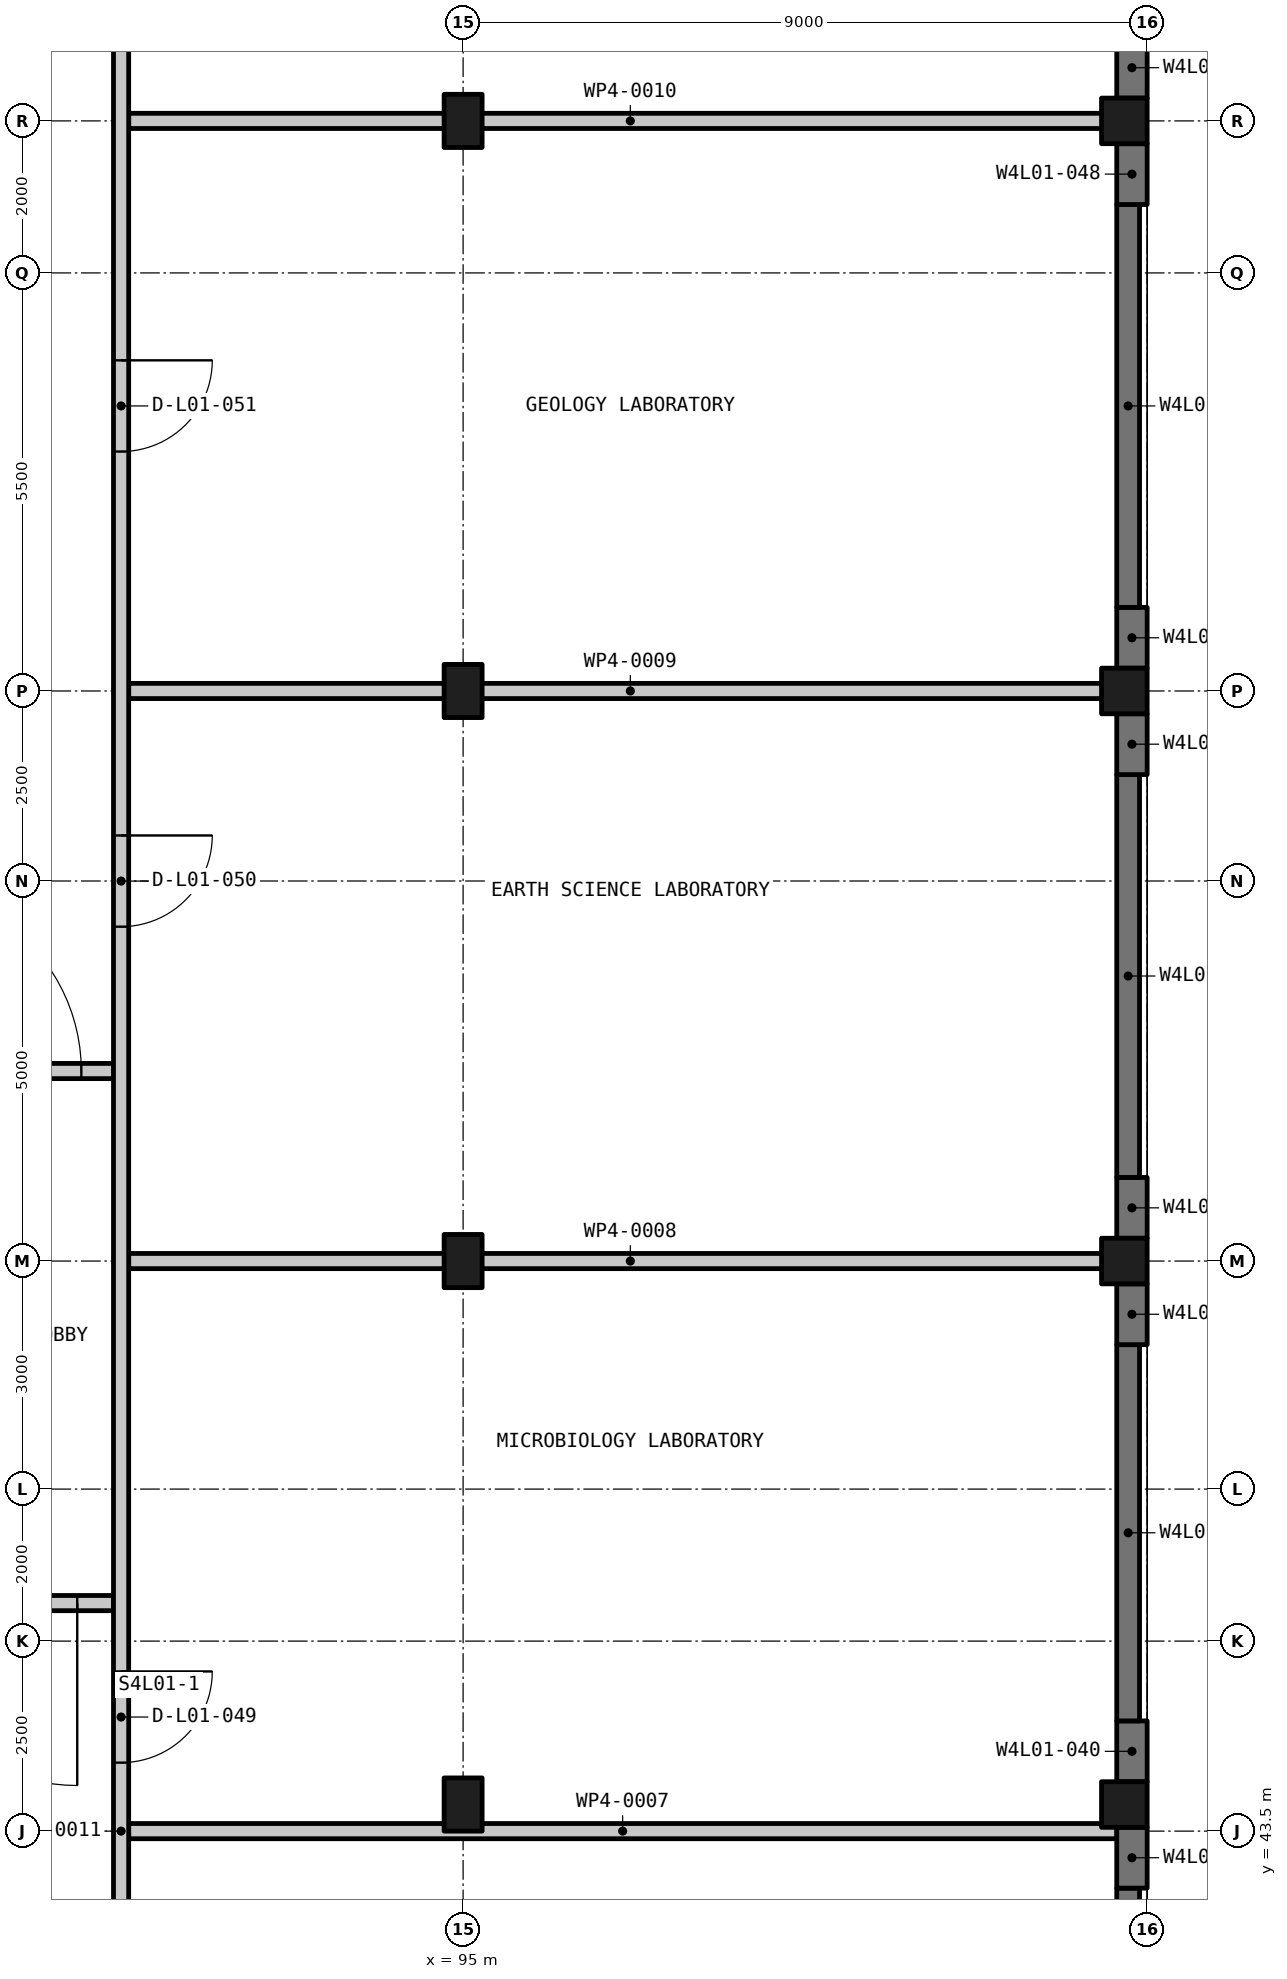
"""IFC4 building model, lengths in metres.
Left out: names, types, materials, properties, quantities, classifications, styles, units other than length and angle.
Written with IfcOpenShell. Run it as: python <this file> out.ifc"""

import sys

from ifc_helpers import new_model, si_unit, direction, frame, frame_2d, origin, origin_2d, place, context, subcontext, project, spatial, rectangle, extrude, element, fill, save


model = new_model("IFC4")
c1 = context("Model", 3, precision=1e-05, world=origin(), true_north=direction((0.0, 1.0)))
c2 = subcontext(c1, "Body", "Model", "MODEL_VIEW")
j1 = project(units=[si_unit("LENGTHUNIT", "METRE"), si_unit("PLANEANGLEUNIT", "RADIAN")], contexts=[c1])
p1 = place(None, origin())
s1 = spatial("IfcSite", under=j1, at=p1, CompositionType="ELEMENT")
p2 = place(p1, origin())
s2 = spatial("IfcBuilding", under=s1, at=p2, CompositionType="ELEMENT")
p3 = place(p2, frame((0.0, 0.0, 6.0)))
s3 = spatial("IfcBuildingStorey", under=s2, at=p3, CompositionType="ELEMENT", Elevation=6.0)
for number, where, z_axis, x_axis in (
    (1, (95.0, 43.85, -0.3), (0.0, 0.0, 1.0), (1.0, 0.0, 0.0)),
    (2, (95.0, 51.0, -0.3), (0.0, 0.0, 1.0), (1.0, 0.0, 0.0)),
    (3, (95.0, 58.5, -0.3), (0.0, 0.0, 1.0), (1.0, 0.0, 0.0)),
    (4, (95.0, 66.0, -0.3), (0.0, 0.0, 1.0), (1.0, 0.0, 0.0)),
):
    element("IfcColumn", number, at=place(p3, frame(where, z_axis=z_axis, x_axis=x_axis)), inside=s3, PredefinedType="COLUMN", context=c2, shape_type="SweptSolid", body=[
        extrude(rectangle(XDim=0.5, YDim=0.7, at=origin_2d()), origin(), (0.0, 0.0, 1.0), 5.25),
    ])
for number, where, z_axis, x_axis in (
    (5, (103.7, 43.85, -0.3), (0.0, 0.0, 1.0), (1.0, 0.0, 0.0)),
    (6, (103.7, 51.0, -0.3), (0.0, 0.0, 1.0), (1.0, 0.0, 0.0)),
    (7, (103.7, 58.5, -0.3), (0.0, 0.0, 1.0), (1.0, 0.0, 0.0)),
    (8, (103.7, 66.0, -0.3), (0.0, 0.0, 1.0), (1.0, 0.0, 0.0)),
):
    element("IfcColumn", number, at=place(p3, frame(where, z_axis=z_axis, x_axis=x_axis)), inside=s3, PredefinedType="COLUMN", context=c2, shape_type="SweptSolid", body=[
        extrude(rectangle(XDim=0.6, YDim=0.6, at=origin_2d()), origin(), (0.0, 0.0, 1.0), 5.25),
    ])
p4 = place(p3, frame((103.75, 37.1, -0.3), z_axis=(0.0, 0.0, 1.0), x_axis=(0.0, 1.0, 0.0)))
e9 = element("IfcWall", 9, at=p4, inside=s3, PredefinedType="SOLIDWALL", context=c2, shape_type="SweptSolid", body=[
    extrude(rectangle(XDim=5.65, YDim=0.3, at=frame_2d((2.825, 0.0))), origin(), (0.0, 0.0, 1.0), 5.25),
])
for number, where, z_axis, x_axis in (
    (10, (103.8, 42.75, -0.3), (0.0, 0.0, 1.0), (0.0, 1.0, 0.0)),
    (11, (103.8, 44.15, -0.3), (0.0, 0.0, 1.0), (0.0, 1.0, 0.0)),
):
    element("IfcWall", number, at=place(p3, frame(where, z_axis=z_axis, x_axis=x_axis)), inside=s3, PredefinedType="SOLIDWALL", context=c2, shape_type="SweptSolid", body=[
        extrude(rectangle(XDim=0.8, YDim=0.4, at=frame_2d((0.4, 0.0))), origin(), (0.0, 0.0, 1.0), 5.25),
    ])
p5 = place(p3, frame((103.75, 44.95, -0.3), z_axis=(0.0, 0.0, 1.0), x_axis=(0.0, 1.0, 0.0)))
e12 = element("IfcWall", 12, at=p5, inside=s3, PredefinedType="SOLIDWALL", context=c2, shape_type="SweptSolid", body=[
    extrude(rectangle(XDim=4.95, YDim=0.3, at=frame_2d((2.475, 0.0))), origin(), (0.0, 0.0, 1.0), 5.25),
])
for number, where, z_axis, x_axis in (
    (13, (103.8, 49.9, -0.3), (0.0, 0.0, 1.0), (0.0, 1.0, 0.0)),
    (14, (103.8, 51.3, -0.3), (0.0, 0.0, 1.0), (0.0, 1.0, 0.0)),
):
    element("IfcWall", number, at=place(p3, frame(where, z_axis=z_axis, x_axis=x_axis)), inside=s3, PredefinedType="SOLIDWALL", context=c2, shape_type="SweptSolid", body=[
        extrude(rectangle(XDim=0.8, YDim=0.4, at=frame_2d((0.4, 0.0))), origin(), (0.0, 0.0, 1.0), 5.25),
    ])
p6 = place(p3, frame((103.75, 52.1, -0.3), z_axis=(0.0, 0.0, 1.0), x_axis=(0.0, 1.0, 0.0)))
e15 = element("IfcWall", 15, at=p6, inside=s3, PredefinedType="SOLIDWALL", context=c2, shape_type="SweptSolid", body=[
    extrude(rectangle(XDim=5.3, YDim=0.3, at=frame_2d((2.65, 0.0))), origin(), (0.0, 0.0, 1.0), 5.25),
])
for number, where, z_axis, x_axis in (
    (16, (103.8, 57.4, -0.3), (0.0, 0.0, 1.0), (0.0, 1.0, 0.0)),
    (17, (103.8, 58.8, -0.3), (0.0, 0.0, 1.0), (0.0, 1.0, 0.0)),
):
    element("IfcWall", number, at=place(p3, frame(where, z_axis=z_axis, x_axis=x_axis)), inside=s3, PredefinedType="SOLIDWALL", context=c2, shape_type="SweptSolid", body=[
        extrude(rectangle(XDim=0.8, YDim=0.4, at=frame_2d((0.4, 0.0))), origin(), (0.0, 0.0, 1.0), 5.25),
    ])
p7 = place(p3, frame((103.75, 59.6, -0.3), z_axis=(0.0, 0.0, 1.0), x_axis=(0.0, 1.0, 0.0)))
e18 = element("IfcWall", 18, at=p7, inside=s3, PredefinedType="SOLIDWALL", context=c2, shape_type="SweptSolid", body=[
    extrude(rectangle(XDim=5.3, YDim=0.3, at=frame_2d((2.65, 0.0))), origin(), (0.0, 0.0, 1.0), 5.25),
])
for number, where, z_axis, x_axis in (
    (19, (103.8, 64.9, -0.3), (0.0, 0.0, 1.0), (0.0, 1.0, 0.0)),
    (20, (103.8, 66.3, -0.3), (0.0, 0.0, 1.0), (0.0, 1.0, 0.0)),
):
    element("IfcWall", number, at=place(p3, frame(where, z_axis=z_axis, x_axis=x_axis)), inside=s3, PredefinedType="SOLIDWALL", context=c2, shape_type="SweptSolid", body=[
        extrude(rectangle(XDim=0.8, YDim=0.4, at=frame_2d((0.4, 0.0))), origin(), (0.0, 0.0, 1.0), 5.25),
    ])
p8 = place(p3, frame((90.6, 43.5, 0.0), z_axis=(0.0, 0.0, 1.0), x_axis=(1.0, 0.0, 0.0)))
e21 = element("IfcWall", 21, at=p8, inside=s3, PredefinedType="PARTITIONING", context=c2, shape_type="SweptSolid", body=[
    extrude(rectangle(XDim=12.998, YDim=0.2, at=frame_2d((6.499, 0.0))), origin(), (0.0, 0.0, 1.0), 4.15),
])
p9 = place(p3, frame((90.4, 46.5, 0.0), z_axis=(0.0, 0.0, 1.0), x_axis=(-1.0, 0.0, 0.0)))
e22 = element("IfcWall", 22, at=p9, inside=s3, PredefinedType="PARTITIONING", context=c2, shape_type="SweptSolid", body=[
    extrude(rectangle(XDim=3.3, YDim=0.2, at=frame_2d((1.65, 0.0))), origin(), (0.0, 0.0, 1.0), 4.15),
])
p10 = place(p9, frame((0.477, 0.0, 0.0)))
e23 = element("IfcOpeningElement", 23, at=p10, cuts=e22, PredefinedType="OPENING", context=c2, shape_type="SweptSolid", body=[
    extrude(rectangle(XDim=2.4, YDim=2.1, at=frame_2d((1.2, 1.05))), frame((0.0, 0.11, 0.0), z_axis=(0.0, -1.0, 0.0), x_axis=(1.0, 0.0, 0.0)), (0.0, 0.0, 1.0), 0.22),
])
p11 = place(p3, frame((90.6, 51.0, 0.0), z_axis=(0.0, 0.0, 1.0), x_axis=(1.0, 0.0, 0.0)))
e24 = element("IfcWall", 24, at=p11, inside=s3, PredefinedType="PARTITIONING", context=c2, shape_type="SweptSolid", body=[
    extrude(rectangle(XDim=13.2, YDim=0.2, at=frame_2d((6.6, 0.0))), origin(), (0.0, 0.0, 1.0), 4.05),
])
p12 = place(p3, frame((87.1, 53.5, 0.0), z_axis=(0.0, 0.0, 1.0), x_axis=(1.0, 0.0, 0.0)))
e25 = element("IfcWall", 25, at=p12, inside=s3, PredefinedType="PARTITIONING", context=c2, shape_type="SweptSolid", body=[
    extrude(rectangle(XDim=3.3, YDim=0.2, at=frame_2d((1.65, 0.0))), origin(), (0.0, 0.0, 1.0), 4.15),
])
p13 = place(p12, frame((0.477, 0.0, 0.0)))
e26 = element("IfcOpeningElement", 26, at=p13, cuts=e25, PredefinedType="OPENING", context=c2, shape_type="SweptSolid", body=[
    extrude(rectangle(XDim=2.4, YDim=2.1, at=frame_2d((1.2, 1.05))), frame((0.0, 0.11, 0.0), z_axis=(0.0, -1.0, 0.0), x_axis=(1.0, 0.0, 0.0)), (0.0, 0.0, 1.0), 0.22),
])
for number, where, z_axis, x_axis in (
    (27, (90.6, 58.5, 0.0), (0.0, 0.0, 1.0), (1.0, 0.0, 0.0)),
    (28, (90.6, 66.0, 0.0), (0.0, 0.0, 1.0), (1.0, 0.0, 0.0)),
):
    element("IfcWall", number, at=place(p3, frame(where, z_axis=z_axis, x_axis=x_axis)), inside=s3, PredefinedType="PARTITIONING", context=c2, shape_type="SweptSolid", body=[
        extrude(rectangle(XDim=13.2, YDim=0.2, at=frame_2d((6.6, 0.0))), origin(), (0.0, 0.0, 1.0), 4.05),
    ])
p14 = place(p3, frame((90.5, 80.8, 0.0), z_axis=(0.0, 0.0, 1.0), x_axis=(0.0, -1.0, 0.0)))
e29 = element("IfcWall", 29, at=p14, inside=s3, PredefinedType="PARTITIONING", context=c2, shape_type="SweptSolid", body=[
    extrude(rectangle(XDim=74.6, YDim=0.2, at=frame_2d((37.3, 0.0))), origin(), (0.0, 0.0, 1.0), 4.05),
])
p15 = place(p14, frame((70.35, 0.0, 0.0)))
e30 = element("IfcOpeningElement", 30, at=p15, cuts=e29, PredefinedType="OPENING", context=c2, shape_type="SweptSolid", body=[
    extrude(rectangle(XDim=1.2, YDim=2.1, at=frame_2d((0.6, 1.05))), frame((0.0, 0.11, 0.0), z_axis=(0.0, -1.0, 0.0), x_axis=(1.0, 0.0, 0.0)), (0.0, 0.0, 1.0), 0.22),
])
p16 = place(p14, frame((62.95, 0.0, 0.0)))
e31 = element("IfcOpeningElement", 31, at=p16, cuts=e29, PredefinedType="OPENING", context=c2, shape_type="SweptSolid", body=[
    extrude(rectangle(XDim=1.2, YDim=2.1, at=frame_2d((0.6, 1.05))), frame((0.0, 0.11, 0.0), z_axis=(0.0, -1.0, 0.0), x_axis=(1.0, 0.0, 0.0)), (0.0, 0.0, 1.0), 0.22),
])
p17 = place(p14, frame((55.45, 0.0, 0.0)))
e32 = element("IfcOpeningElement", 32, at=p17, cuts=e29, PredefinedType="OPENING", context=c2, shape_type="SweptSolid", body=[
    extrude(rectangle(XDim=1.2, YDim=2.1, at=frame_2d((0.6, 1.05))), frame((0.0, 0.11, 0.0), z_axis=(0.0, -1.0, 0.0), x_axis=(1.0, 0.0, 0.0)), (0.0, 0.0, 1.0), 0.22),
])
p18 = place(p14, frame((47.95, 0.0, 0.0)))
e33 = element("IfcOpeningElement", 33, at=p18, cuts=e29, PredefinedType="OPENING", context=c2, shape_type="SweptSolid", body=[
    extrude(rectangle(XDim=1.2, YDim=2.1, at=frame_2d((0.6, 1.05))), frame((0.0, 0.11, 0.0), z_axis=(0.0, -1.0, 0.0), x_axis=(1.0, 0.0, 0.0)), (0.0, 0.0, 1.0), 0.22),
])
p19 = place(p14, frame((40.45, 0.0, 0.0)))
e34 = element("IfcOpeningElement", 34, at=p19, cuts=e29, PredefinedType="OPENING", context=c2, shape_type="SweptSolid", body=[
    extrude(rectangle(XDim=1.2, YDim=2.1, at=frame_2d((0.6, 1.05))), frame((0.0, 0.11, 0.0), z_axis=(0.0, -1.0, 0.0), x_axis=(1.0, 0.0, 0.0)), (0.0, 0.0, 1.0), 0.22),
])
p20 = place(p14, frame((35.199, 0.0, 0.0)))
e35 = element("IfcOpeningElement", 35, at=p20, cuts=e29, PredefinedType="OPENING", context=c2, shape_type="SweptSolid", body=[
    extrude(rectangle(XDim=1.2, YDim=2.1, at=frame_2d((0.6, 1.05))), frame((0.0, 0.11, 0.0), z_axis=(0.0, -1.0, 0.0), x_axis=(1.0, 0.0, 0.0)), (0.0, 0.0, 1.0), 0.22),
])
p21 = place(p14, frame((24.201, 0.0, 0.0)))
e36 = element("IfcOpeningElement", 36, at=p21, cuts=e29, PredefinedType="OPENING", context=c2, shape_type="SweptSolid", body=[
    extrude(rectangle(XDim=1.2, YDim=2.1, at=frame_2d((0.6, 1.05))), frame((0.0, 0.11, 0.0), z_axis=(0.0, -1.0, 0.0), x_axis=(1.0, 0.0, 0.0)), (0.0, 0.0, 1.0), 0.22),
])
p22 = place(p14, frame((17.95, 0.0, 0.0)))
e37 = element("IfcOpeningElement", 37, at=p22, cuts=e29, PredefinedType="OPENING", context=c2, shape_type="SweptSolid", body=[
    extrude(rectangle(XDim=1.2, YDim=2.1, at=frame_2d((0.6, 1.05))), frame((0.0, 0.11, 0.0), z_axis=(0.0, -1.0, 0.0), x_axis=(1.0, 0.0, 0.0)), (0.0, 0.0, 1.0), 0.22),
])
p23 = place(p14, frame((6.825, 0.0, 0.0)))
e38 = element("IfcOpeningElement", 38, at=p23, cuts=e29, PredefinedType="OPENING", context=c2, shape_type="SweptSolid", body=[
    extrude(rectangle(XDim=1.2, YDim=2.1, at=frame_2d((0.6, 1.05))), frame((0.0, 0.11, 0.0), z_axis=(0.0, -1.0, 0.0), x_axis=(1.0, 0.0, 0.0)), (0.0, 0.0, 1.0), 0.22),
])
p24 = place(p13, origin())
e39 = element("IfcDoor", 39, at=p24, inside=s3, OperationType="DOUBLE_DOOR_SINGLE_SWING", PredefinedType="DOOR", context=c2, shape_type="SweptSolid", body=[
    extrude(rectangle(XDim=2.4, YDim=2.1, at=frame_2d((1.2, 1.05))), frame((0.0, 0.025, 0.0), z_axis=(0.0, -1.0, 0.0), x_axis=(1.0, 0.0, 0.0)), (0.0, 0.0, 1.0), 0.05),
])
fill(e26, e39)
p25 = place(p10, origin())
e40 = element("IfcDoor", 40, at=p25, inside=s3, OperationType="DOUBLE_DOOR_SINGLE_SWING", PredefinedType="DOOR", context=c2, shape_type="SweptSolid", body=[
    extrude(rectangle(XDim=2.4, YDim=2.1, at=frame_2d((1.2, 1.05))), frame((0.0, 0.025, 0.0), z_axis=(0.0, -1.0, 0.0), x_axis=(1.0, 0.0, 0.0)), (0.0, 0.0, 1.0), 0.05),
])
fill(e23, e40)
p26 = place(p20, origin())
e41 = element("IfcDoor", 41, at=p26, inside=s3, OperationType="SINGLE_SWING_RIGHT", PredefinedType="DOOR", context=c2, shape_type="SweptSolid", body=[
    extrude(rectangle(XDim=1.2, YDim=2.1, at=frame_2d((0.6, 1.05))), frame((0.0, 0.025, 0.0), z_axis=(0.0, -1.0, 0.0), x_axis=(1.0, 0.0, 0.0)), (0.0, 0.0, 1.0), 0.05),
])
fill(e35, e41)
p27 = place(p21, origin())
e42 = element("IfcDoor", 42, at=p27, inside=s3, OperationType="SINGLE_SWING_RIGHT", PredefinedType="DOOR", context=c2, shape_type="SweptSolid", body=[
    extrude(rectangle(XDim=1.2, YDim=2.1, at=frame_2d((0.6, 1.05))), frame((0.0, 0.025, 0.0), z_axis=(0.0, -1.0, 0.0), x_axis=(1.0, 0.0, 0.0)), (0.0, 0.0, 1.0), 0.05),
])
fill(e36, e42)
p28 = place(p22, origin())
e43 = element("IfcDoor", 43, at=p28, inside=s3, OperationType="SINGLE_SWING_RIGHT", PredefinedType="DOOR", context=c2, shape_type="SweptSolid", body=[
    extrude(rectangle(XDim=1.2, YDim=2.1, at=frame_2d((0.6, 1.05))), frame((0.0, 0.025, 0.0), z_axis=(0.0, -1.0, 0.0), x_axis=(1.0, 0.0, 0.0)), (0.0, 0.0, 1.0), 0.05),
])
fill(e37, e43)
save(model, sys.argv[1])
